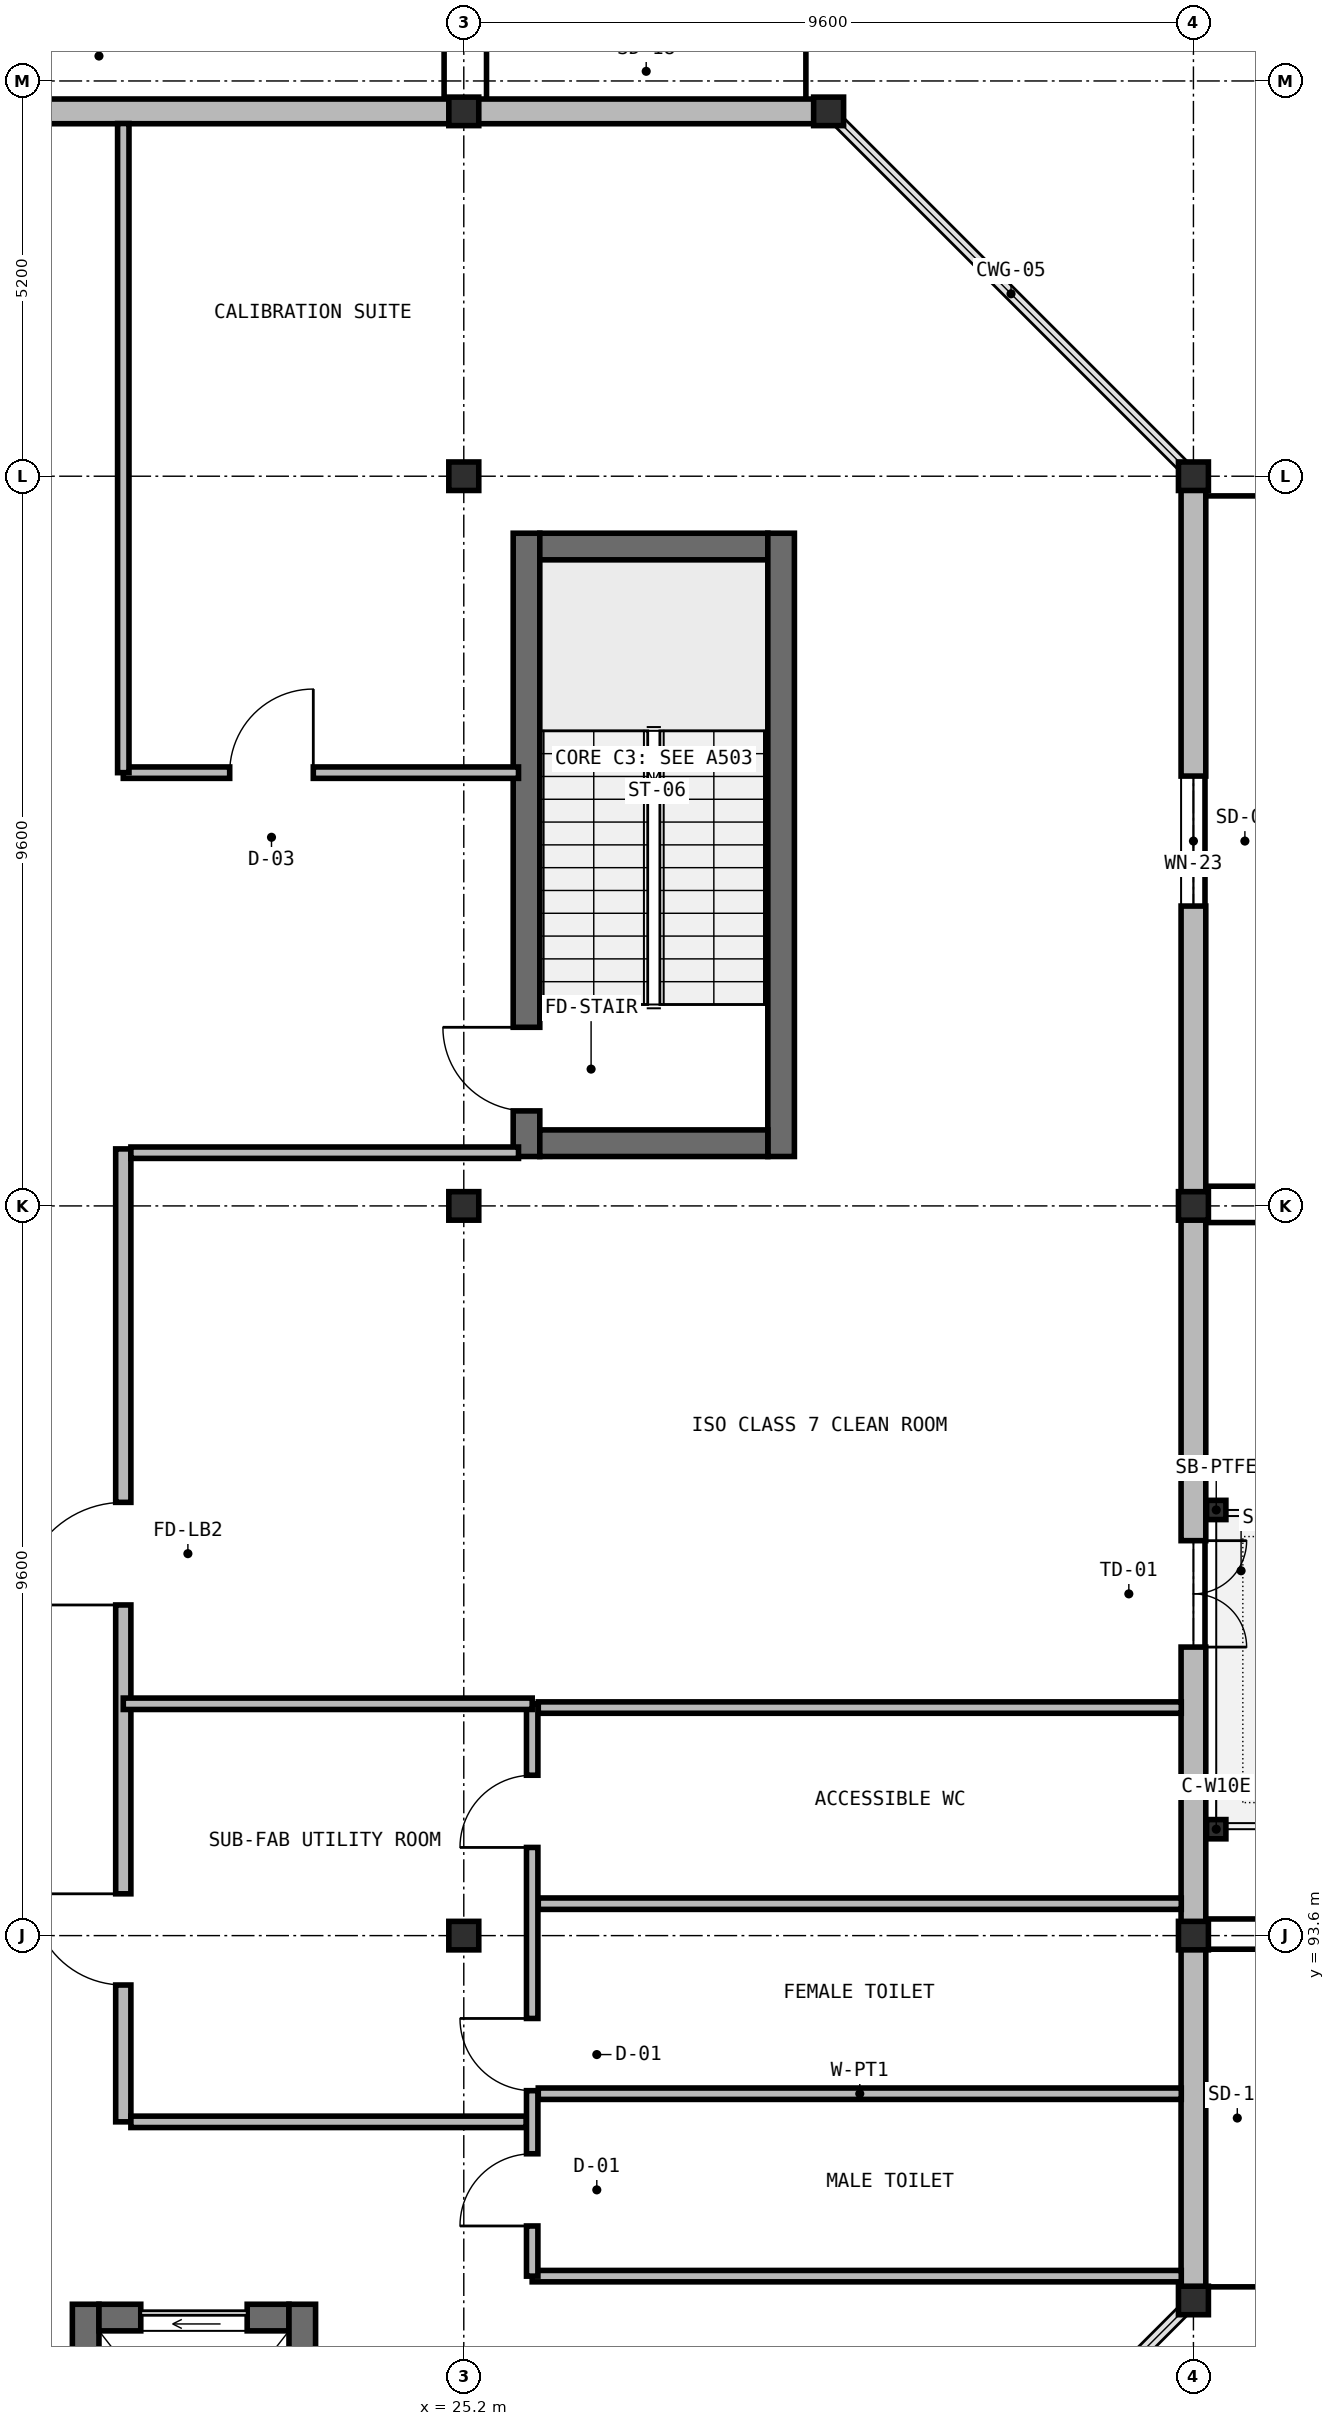
"""IFC4 building model, lengths in metres.
Left out: names, types, materials, properties, quantities, classifications, styles, units other than length and angle.
Written with IfcOpenShell. Run it as: python <this file> out.ifc"""

import sys

from ifc_helpers import new_model, si_unit, direction, frame, frame_2d, origin, origin_2d, place, context, subcontext, project, spatial, rectangle, i_section, extrude, element, fill, save


model = new_model("IFC4")
c1 = context("Model", 3, precision=1e-05, world=origin(), true_north=direction((0.0, 1.0)))
c2 = subcontext(c1, "Body", "Model", "MODEL_VIEW")
j1 = project(units=[si_unit("LENGTHUNIT", "METRE"), si_unit("PLANEANGLEUNIT", "RADIAN")], contexts=[c1])
p1 = place(None, origin())
s1 = spatial("IfcSite", under=j1, at=p1, CompositionType="ELEMENT")
p2 = place(p1, origin())
s2 = spatial("IfcBuilding", under=s1, at=p2, CompositionType="ELEMENT")
p3 = place(p2, frame((0.0, 0.0, 5.25)))
s3 = spatial("IfcBuildingStorey", under=s2, at=p3, CompositionType="ELEMENT", Elevation=5.25)
p4 = place(p3, frame((26.025, 103.85, 0.0), z_axis=(0.0, 0.0, 1.0), x_axis=(0.0, 1.0, 0.0)))
e1 = element("IfcWall", 1, at=p4, inside=s3, PredefinedType="SHEAR", context=c2, shape_type="SweptSolid", body=[
    extrude(rectangle(XDim=8.2, YDim=0.35, at=frame_2d((4.1, 0.0))), origin(), (0.0, 0.0, 1.0), 4.55),
])
p5 = place(p4, frame((0.6, 0.0, 0.0)))
e2 = element("IfcOpeningElement", 2, at=p5, cuts=e1, PredefinedType="OPENING", context=c2, shape_type="SweptSolid", body=[
    extrude(rectangle(XDim=1.1, YDim=2.15, at=frame_2d((0.55, 1.075))), frame((0.0, 0.185, 0.0), z_axis=(0.0, -1.0, 0.0), x_axis=(1.0, 0.0, 0.0)), (0.0, 0.0, 1.0), 0.37),
])
p6 = place(p3, frame((26.2, 111.875, 0.0), z_axis=(0.0, 0.0, 1.0), x_axis=(1.0, 0.0, 0.0)))
e3 = element("IfcWall", 3, at=p6, inside=s3, PredefinedType="SHEAR", context=c2, shape_type="SweptSolid", body=[
    extrude(rectangle(XDim=3.0, YDim=0.35, at=frame_2d((1.5, 0.0))), origin(), (0.0, 0.0, 1.0), 4.55),
])
p7 = place(p3, frame((29.375, 112.05, 0.0), z_axis=(0.0, 0.0, 1.0), x_axis=(0.0, -1.0, 0.0)))
e4 = element("IfcWall", 4, at=p7, inside=s3, PredefinedType="SHEAR", context=c2, shape_type="SweptSolid", body=[
    extrude(rectangle(XDim=8.2, YDim=0.35, at=frame_2d((4.1, 0.0))), origin(), (0.0, 0.0, 1.0), 4.55),
])
p8 = place(p3, frame((29.2, 104.025, 0.0), z_axis=(0.0, 0.0, 1.0), x_axis=(-1.0, 0.0, 0.0)))
e5 = element("IfcWall", 5, at=p8, inside=s3, PredefinedType="SHEAR", context=c2, shape_type="SweptSolid", body=[
    extrude(rectangle(XDim=3.0, YDim=0.35, at=frame_2d((1.5, 0.0))), origin(), (0.0, 0.0, 1.0), 4.55),
])
p9 = place(p3, frame((20.225, 84.85, 0.0), z_axis=(0.0, 0.0, 1.0), x_axis=(0.0, 1.0, 0.0)))
e6 = element("IfcWall", 6, at=p9, inside=s3, PredefinedType="SHEAR", context=c2, shape_type="SweptSolid", body=[
    extrude(rectangle(XDim=3.9, YDim=0.35, at=frame_2d((1.95, 0.0))), origin(), (0.0, 0.0, 1.0), 4.55),
])
p10 = place(p3, frame((20.4, 88.575, 0.0), z_axis=(0.0, 0.0, 1.0), x_axis=(1.0, 0.0, 0.0)))
e7 = element("IfcWall", 7, at=p10, inside=s3, PredefinedType="SHEAR", context=c2, shape_type="SweptSolid", body=[
    extrude(rectangle(XDim=2.5, YDim=0.35, at=frame_2d((1.25, 0.0))), origin(), (0.0, 0.0, 1.0), 4.55),
])
p11 = place(p10, frame((0.55, 0.0, 0.0)))
e8 = element("IfcOpeningElement", 8, at=p11, cuts=e7, PredefinedType="OPENING", context=c2, shape_type="SweptSolid", body=[
    extrude(rectangle(XDim=1.4, YDim=2.3, at=frame_2d((0.7, 1.15))), frame((0.0, 0.185, 0.0), z_axis=(0.0, -1.0, 0.0), x_axis=(1.0, 0.0, 0.0)), (0.0, 0.0, 1.0), 0.37),
])
p12 = place(p3, frame((23.075, 88.75, 0.0), z_axis=(0.0, 0.0, 1.0), x_axis=(0.0, -1.0, 0.0)))
e9 = element("IfcWall", 9, at=p12, inside=s3, PredefinedType="SHEAR", context=c2, shape_type="SweptSolid", body=[
    extrude(rectangle(XDim=3.9, YDim=0.35, at=frame_2d((1.95, 0.0))), origin(), (0.0, 0.0, 1.0), 4.55),
])
for number, where, z_axis, x_axis in (
    (10, (25.2, 93.6, 0.0), (0.0, 0.0, 1.0), (1.0, 0.0, 0.0)),
    (11, (25.2, 103.2, 0.0), (0.0, 0.0, 1.0), (1.0, 0.0, 0.0)),
    (12, (25.2, 112.8, 0.0), (0.0, 0.0, 1.0), (1.0, 0.0, 0.0)),
    (13, (25.2, 117.6, 0.0), (0.0, 0.0, 1.0), (1.0, 0.0, 0.0)),
    (14, (34.8, 93.6, 0.0), (0.0, 0.0, 1.0), (1.0, 0.0, 0.0)),
    (15, (34.8, 103.2, 0.0), (0.0, 0.0, 1.0), (1.0, 0.0, 0.0)),
    (16, (34.8, 112.8, 0.0), (0.0, 0.0, 1.0), (1.0, 0.0, 0.0)),
    (17, (34.8, 88.8, 0.0), (0.0, 0.0, 1.0), (1.0, 0.0, 0.0)),
    (18, (30.0, 117.6, 0.0), (0.0, 0.0, 1.0), (1.0, 0.0, 0.0)),
):
    element("IfcColumn", number, at=place(p3, frame(where, z_axis=z_axis, x_axis=x_axis)), inside=s3, PredefinedType="COLUMN", context=c2, shape_type="SweptSolid", body=[
        extrude(i_section(OverallWidth=0.394, OverallDepth=0.375, WebThickness=0.02, FlangeThickness=0.032, at=origin_2d()), origin(), (0.0, 0.0, 1.0), 4.55),
    ])
for number, where, z_axis, x_axis in (
    (19, (35.1, 95.0, 0.0), (0.0, 0.0, 1.0), (1.0, 0.0, 0.0)),
    (20, (35.1, 99.2, 0.0), (0.0, 0.0, 1.0), (1.0, 0.0, 0.0)),
):
    element("IfcColumn", number, at=place(p3, frame(where, z_axis=z_axis, x_axis=x_axis)), inside=s3, PredefinedType="COLUMN", context=c2, shape_type="SweptSolid", body=[
        extrude(i_section(OverallWidth=0.254, OverallDepth=0.253, WebThickness=0.009, FlangeThickness=0.014, at=origin_2d()), origin(), (0.0, 0.0, 1.0), 4.55),
    ])
p13 = place(p3, frame((15.604, 117.6, 0.0), z_axis=(0.0, 0.0, 1.0), x_axis=(1.0, 0.0, 0.0)))
e21 = element("IfcWall", 21, at=p13, inside=s3, PredefinedType="SOLIDWALL", context=c2, shape_type="SweptSolid", body=[
    extrude(rectangle(XDim=9.592, YDim=0.325, at=frame_2d((4.796, 0.0))), origin(), (0.0, 0.0, 1.0), 3.884),
])
for number, where, z_axis, x_axis in (
    (22, (25.204, 117.6, 0.0), (0.0, 0.0, 1.0), (1.0, 0.0, 0.0)),
    (23, (34.8, 93.596, 0.0), (0.0, 0.0, 1.0), (0.0, -1.0, 0.0)),
):
    element("IfcWall", number, at=place(p3, frame(where, z_axis=z_axis, x_axis=x_axis)), inside=s3, PredefinedType="SOLIDWALL", context=c2, shape_type="SweptSolid", body=[
        extrude(rectangle(XDim=4.792, YDim=0.325, at=frame_2d((2.396, 0.0))), origin(), (0.0, 0.0, 1.0), 4.37),
    ])
p14 = place(p3, frame((34.8, 103.196, 0.0), z_axis=(0.0, 0.0, 1.0), x_axis=(0.0, -1.0, 0.0)))
e24 = element("IfcWall", 24, at=p14, inside=s3, PredefinedType="SOLIDWALL", context=c2, shape_type="SweptSolid", body=[
    extrude(rectangle(XDim=9.592, YDim=0.325, at=frame_2d((4.796, 0.0))), origin(), (0.0, 0.0, 1.0), 3.862),
])
p15 = place(p14, frame((4.4, 0.0, 0.0)))
e25 = element("IfcOpeningElement", 25, at=p15, cuts=e24, PredefinedType="OPENING", context=c2, shape_type="SweptSolid", body=[
    extrude(rectangle(XDim=1.4, YDim=2.2, at=frame_2d((0.7, 1.1))), frame((0.0, 0.172, 0.0), z_axis=(0.0, -1.0, 0.0), x_axis=(1.0, 0.0, 0.0)), (0.0, 0.0, 1.0), 0.345),
])
p16 = place(p3, frame((34.8, 112.796, 0.0), z_axis=(0.0, 0.0, 1.0), x_axis=(0.0, -1.0, 0.0)))
e26 = element("IfcWall", 26, at=p16, inside=s3, PredefinedType="SOLIDWALL", context=c2, shape_type="SweptSolid", body=[
    extrude(rectangle(XDim=9.592, YDim=0.325, at=frame_2d((4.796, 0.0))), origin(), (0.0, 0.0, 1.0), 3.884),
])
p17 = place(p16, frame((3.941, 0.0, 0.95)))
e27 = element("IfcOpeningElement", 27, at=p17, cuts=e26, PredefinedType="OPENING", context=c2, shape_type="SweptSolid", body=[
    extrude(rectangle(XDim=1.71, YDim=1.59, at=frame_2d((0.855, 0.795))), frame((0.0, 0.172, 0.0), z_axis=(0.0, -1.0, 0.0), x_axis=(1.0, 0.0, 0.0)), (0.0, 0.0, 1.0), 0.345),
])
for number, where, z_axis, x_axis in (
    (28, (26.18, 91.52, 0.0), (0.0, 0.0, 1.0), (1.0, 0.0, 0.0)),
    (29, (26.18, 94.02, 0.0), (0.0, 0.0, 1.0), (1.0, 0.0, 0.0)),
    (30, (26.18, 96.6, 0.0), (0.0, 0.0, 1.0), (1.0, 0.0, 0.0)),
):
    element("IfcWall", number, at=place(p3, frame(where, z_axis=z_axis, x_axis=x_axis)), inside=s3, PredefinedType="PARTITIONING", context=c2, shape_type="SweptSolid", body=[
        extrude(rectangle(XDim=8.46, YDim=0.15, at=frame_2d((4.23, 0.0))), origin(), (0.0, 0.0, 1.0), 4.23),
    ])
p18 = place(p3, frame((26.1, 89.12, 0.0), z_axis=(0.0, 0.0, 1.0), x_axis=(1.0, 0.0, 0.0)))
e31 = element("IfcWall", 31, at=p18, inside=s3, PredefinedType="PARTITIONING", context=c2, shape_type="SweptSolid", body=[
    extrude(rectangle(XDim=8.54, YDim=0.15, at=frame_2d((4.27, 0.0))), origin(), (0.0, 0.0, 1.0), 4.23),
])
p19 = place(p3, frame((26.1, 89.12, 0.0), z_axis=(0.0, 0.0, 1.0), x_axis=(0.0, 1.0, 0.0)))
e32 = element("IfcWall", 32, at=p19, inside=s3, PredefinedType="PARTITIONING", context=c2, shape_type="SweptSolid", body=[
    extrude(rectangle(XDim=7.53, YDim=0.15, at=frame_2d((3.765, 0.0))), origin(), (0.0, 0.0, 1.0), 4.23),
])
p20 = place(p19, frame((0.66, 0.0, 0.0)))
e33 = element("IfcOpeningElement", 33, at=p20, cuts=e32, PredefinedType="OPENING", context=c2, shape_type="SweptSolid", body=[
    extrude(rectangle(XDim=0.95, YDim=2.1, at=frame_2d((0.475, 1.05))), frame((0.0, 0.085, 0.0), z_axis=(0.0, -1.0, 0.0), x_axis=(1.0, 0.0, 0.0)), (0.0, 0.0, 1.0), 0.17),
])
p21 = place(p19, frame((2.44, 0.0, 0.0)))
e34 = element("IfcOpeningElement", 34, at=p21, cuts=e32, PredefinedType="OPENING", context=c2, shape_type="SweptSolid", body=[
    extrude(rectangle(XDim=0.95, YDim=2.1, at=frame_2d((0.475, 1.05))), frame((0.0, 0.085, 0.0), z_axis=(0.0, -1.0, 0.0), x_axis=(1.0, 0.0, 0.0)), (0.0, 0.0, 1.0), 0.17),
])
p22 = place(p19, frame((5.64, 0.0, 0.0)))
e35 = element("IfcOpeningElement", 35, at=p22, cuts=e32, PredefinedType="OPENING", context=c2, shape_type="SweptSolid", body=[
    extrude(rectangle(XDim=0.95, YDim=2.1, at=frame_2d((0.475, 1.05))), frame((0.0, 0.085, 0.0), z_axis=(0.0, -1.0, 0.0), x_axis=(1.0, 0.0, 0.0)), (0.0, 0.0, 1.0), 0.17),
])
p23 = place(p3, frame((20.72, 108.9, 0.0), z_axis=(0.0, 0.0, 1.0), x_axis=(1.0, 0.0, 0.0)))
e36 = element("IfcWall", 36, at=p23, inside=s3, PredefinedType="PARTITIONING", context=c2, shape_type="SweptSolid", body=[
    extrude(rectangle(XDim=5.2, YDim=0.15, at=frame_2d((2.6, 0.0))), origin(), (0.0, 0.0, 1.0), 4.23),
])
p24 = place(p23, frame((1.4, 0.0, 0.0)))
e37 = element("IfcOpeningElement", 37, at=p24, cuts=e36, PredefinedType="OPENING", context=c2, shape_type="SweptSolid", body=[
    extrude(rectangle(XDim=1.1, YDim=2.2, at=frame_2d((0.55, 1.1))), frame((0.0, 0.085, 0.0), z_axis=(0.0, -1.0, 0.0), x_axis=(1.0, 0.0, 0.0)), (0.0, 0.0, 1.0), 0.17),
])
p25 = place(p3, frame((20.72, 108.9, 0.0), z_axis=(0.0, 0.0, 1.0), x_axis=(0.0, 1.0, 0.0)))
e38 = element("IfcWall", 38, at=p25, inside=s3, PredefinedType="PARTITIONING", context=c2, shape_type="SweptSolid", body=[
    extrude(rectangle(XDim=8.54, YDim=0.15, at=frame_2d((4.27, 0.0))), origin(), (0.0, 0.0, 1.0), 4.23),
])
p26 = place(p3, frame((20.72, 91.15, 0.0), z_axis=(0.0, 0.0, 1.0), x_axis=(0.0, 1.0, 0.0)))
e39 = element("IfcWall", 39, at=p26, inside=s3, PredefinedType="SOLIDWALL", context=c2, shape_type="SweptSolid", body=[
    extrude(rectangle(XDim=12.8, YDim=0.2, at=frame_2d((6.4, 0.0))), origin(), (0.0, 0.0, 1.0), 4.23),
])
p27 = place(p26, frame((1.8, 0.0, 0.0)))
e40 = element("IfcOpeningElement", 40, at=p27, cuts=e39, PredefinedType="OPENING", context=c2, shape_type="SweptSolid", body=[
    extrude(rectangle(XDim=1.2, YDim=2.2, at=frame_2d((0.6, 1.1))), frame((0.0, 0.11, 0.0), z_axis=(0.0, -1.0, 0.0), x_axis=(1.0, 0.0, 0.0)), (0.0, 0.0, 1.0), 0.22),
])
p28 = place(p26, frame((6.8, 0.0, 0.0)))
e41 = element("IfcOpeningElement", 41, at=p28, cuts=e39, PredefinedType="OPENING", context=c2, shape_type="SweptSolid", body=[
    extrude(rectangle(XDim=1.35, YDim=2.2, at=frame_2d((0.675, 1.1))), frame((0.0, 0.11, 0.0), z_axis=(0.0, -1.0, 0.0), x_axis=(1.0, 0.0, 0.0)), (0.0, 0.0, 1.0), 0.22),
])
p29 = place(p3, frame((20.82, 91.15, 0.0), z_axis=(0.0, 0.0, 1.0), x_axis=(1.0, 0.0, 0.0)))
e42 = element("IfcWall", 42, at=p29, inside=s3, PredefinedType="PARTITIONING", context=c2, shape_type="SweptSolid", body=[
    extrude(rectangle(XDim=5.2, YDim=0.15, at=frame_2d((2.6, 0.0))), origin(), (0.0, 0.0, 1.0), 4.23),
])
p30 = place(p3, frame((20.82, 103.9, 0.0), z_axis=(0.0, 0.0, 1.0), x_axis=(1.0, 0.0, 0.0)))
e43 = element("IfcWall", 43, at=p30, inside=s3, PredefinedType="PARTITIONING", context=c2, shape_type="SweptSolid", body=[
    extrude(rectangle(XDim=5.1, YDim=0.15, at=frame_2d((2.55, 0.0))), origin(), (0.0, 0.0, 1.0), 4.23),
])
p31 = place(p3, frame((20.72, 96.65, 0.0), z_axis=(0.0, 0.0, 1.0), x_axis=(1.0, 0.0, 0.0)))
e44 = element("IfcWall", 44, at=p31, inside=s3, PredefinedType="PARTITIONING", context=c2, shape_type="SweptSolid", body=[
    extrude(rectangle(XDim=5.38, YDim=0.15, at=frame_2d((2.69, 0.0))), origin(), (0.0, 0.0, 1.0), 4.23),
])
p32 = place(p15, origin())
e45 = element("IfcDoor", 45, at=p32, inside=s3, OperationType="DOUBLE_DOOR_SINGLE_SWING", PredefinedType="DOOR", context=c2, shape_type="SweptSolid", body=[
    extrude(rectangle(XDim=1.4, YDim=2.2, at=frame_2d((0.7, 1.1))), frame((0.0, 0.025, 0.0), z_axis=(0.0, -1.0, 0.0), x_axis=(1.0, 0.0, 0.0)), (0.0, 0.0, 1.0), 0.05),
])
fill(e25, e45)
p33 = place(p17, origin())
e46 = element("IfcWindow", 46, at=p33, inside=s3, PartitioningType="SINGLE_PANEL", PredefinedType="WINDOW", context=c2, shape_type="SweptSolid", body=[
    extrude(rectangle(XDim=1.71, YDim=1.59, at=frame_2d((0.855, 0.795))), frame((0.0, 0.03, 0.0), z_axis=(0.0, -1.0, 0.0), x_axis=(1.0, 0.0, 0.0)), (0.0, 0.0, 1.0), 0.06),
])
fill(e27, e46)
p34 = place(p5, origin())
e47 = element("IfcDoor", 47, at=p34, inside=s3, OperationType="SINGLE_SWING_RIGHT", PredefinedType="DOOR", context=c2, shape_type="SweptSolid", body=[
    extrude(rectangle(XDim=1.1, YDim=2.15, at=frame_2d((0.55, 1.075))), frame((0.0, 0.025, 0.0), z_axis=(0.0, -1.0, 0.0), x_axis=(1.0, 0.0, 0.0)), (0.0, 0.0, 1.0), 0.05),
])
fill(e2, e47)
p35 = place(p11, origin())
e48 = element("IfcDoor", 48, at=p35, inside=s3, OperationType="SLIDING_TO_LEFT", PredefinedType="USERDEFINED", context=c2, shape_type="SweptSolid", body=[
    extrude(rectangle(XDim=1.4, YDim=2.3, at=frame_2d((0.7, 1.15))), frame((0.0, 0.025, 0.0), z_axis=(0.0, -1.0, 0.0), x_axis=(1.0, 0.0, 0.0)), (0.0, 0.0, 1.0), 0.05),
])
fill(e8, e48)
p36 = place(p20, origin())
e49 = element("IfcDoor", 49, at=p36, inside=s3, OperationType="SINGLE_SWING_LEFT", PredefinedType="DOOR", context=c2, shape_type="SweptSolid", body=[
    extrude(rectangle(XDim=0.95, YDim=2.1, at=frame_2d((0.475, 1.05))), frame((0.0, 0.025, 0.0), z_axis=(0.0, -1.0, 0.0), x_axis=(1.0, 0.0, 0.0)), (0.0, 0.0, 1.0), 0.05),
])
fill(e33, e49)
p37 = place(p21, origin())
e50 = element("IfcDoor", 50, at=p37, inside=s3, OperationType="SINGLE_SWING_RIGHT", PredefinedType="DOOR", context=c2, shape_type="SweptSolid", body=[
    extrude(rectangle(XDim=0.95, YDim=2.1, at=frame_2d((0.475, 1.05))), frame((0.0, 0.025, 0.0), z_axis=(0.0, -1.0, 0.0), x_axis=(1.0, 0.0, 0.0)), (0.0, 0.0, 1.0), 0.05),
])
fill(e34, e50)
p38 = place(p22, origin())
e51 = element("IfcDoor", 51, at=p38, inside=s3, OperationType="SINGLE_SWING_LEFT", PredefinedType="DOOR", context=c2, shape_type="SweptSolid", body=[
    extrude(rectangle(XDim=0.95, YDim=2.1, at=frame_2d((0.475, 1.05))), frame((0.0, 0.025, 0.0), z_axis=(0.0, -1.0, 0.0), x_axis=(1.0, 0.0, 0.0)), (0.0, 0.0, 1.0), 0.05),
])
fill(e35, e51)
p39 = place(p24, origin())
e52 = element("IfcDoor", 52, at=p39, inside=s3, OperationType="SINGLE_SWING_RIGHT", PredefinedType="DOOR", context=c2, shape_type="SweptSolid", body=[
    extrude(rectangle(XDim=1.1, YDim=2.2, at=frame_2d((0.55, 1.1))), frame((0.0, 0.025, 0.0), z_axis=(0.0, -1.0, 0.0), x_axis=(1.0, 0.0, 0.0)), (0.0, 0.0, 1.0), 0.05),
])
fill(e37, e52)
p40 = place(p27, origin())
e53 = element("IfcDoor", 53, at=p40, inside=s3, OperationType="SINGLE_SWING_RIGHT", PredefinedType="DOOR", context=c2, shape_type="SweptSolid", body=[
    extrude(rectangle(XDim=1.2, YDim=2.2, at=frame_2d((0.6, 1.1))), frame((0.0, 0.025, 0.0), z_axis=(0.0, -1.0, 0.0), x_axis=(1.0, 0.0, 0.0)), (0.0, 0.0, 1.0), 0.05),
])
fill(e40, e53)
p41 = place(p28, origin())
e54 = element("IfcDoor", 54, at=p41, inside=s3, OperationType="SINGLE_SWING_LEFT", PredefinedType="DOOR", context=c2, shape_type="SweptSolid", body=[
    extrude(rectangle(XDim=1.35, YDim=2.2, at=frame_2d((0.675, 1.1))), frame((0.0, 0.025, 0.0), z_axis=(0.0, -1.0, 0.0), x_axis=(1.0, 0.0, 0.0)), (0.0, 0.0, 1.0), 0.05),
])
fill(e41, e54)
save(model, sys.argv[1])
